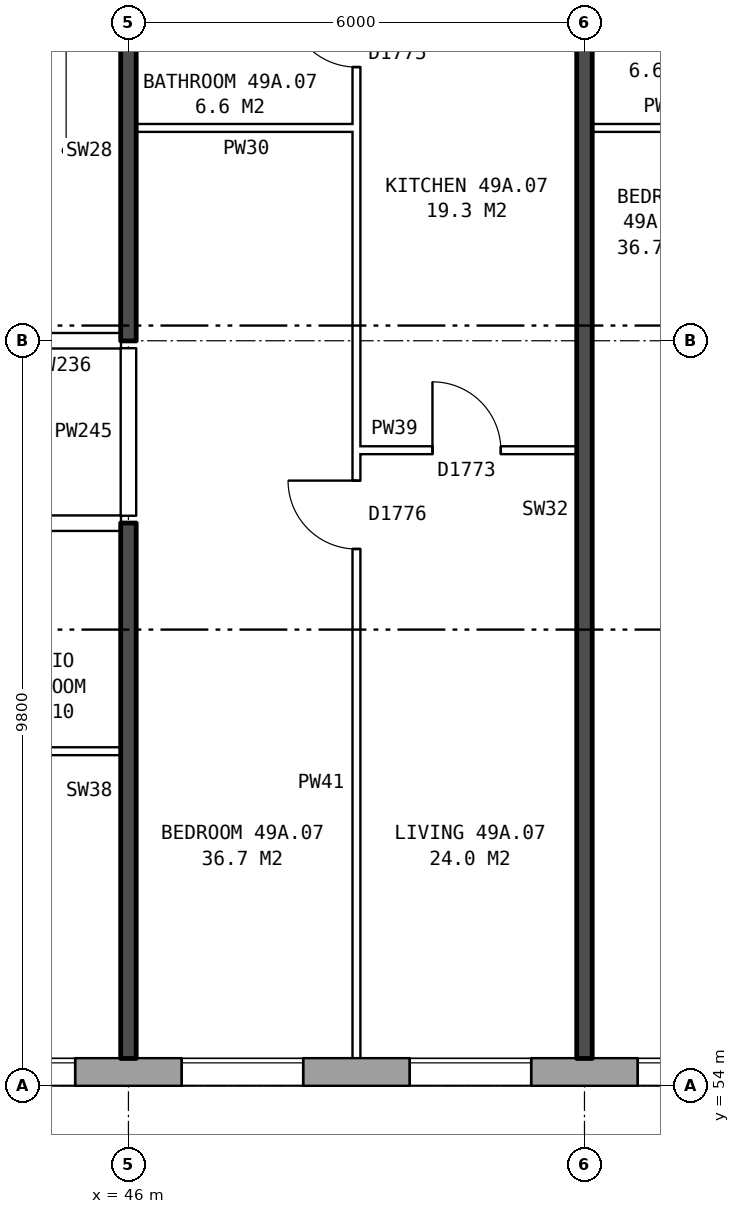
"""IFC4 building model, lengths in metres.
Left out: names, types, materials, properties, quantities, classifications, styles, units other than length and angle.
Written with IfcOpenShell. Run it as: python <this file> out.ifc"""

import sys

from ifc_helpers import new_model, si_unit, direction, frame, frame_2d, origin, place, context, subcontext, project, spatial, rectangle, extrude, element, fill, save


model = new_model("IFC4")
c1 = context("Model", 3, precision=1e-05, world=origin(), true_north=direction((0.0, 1.0)))
c2 = subcontext(c1, "Body", "Model", "MODEL_VIEW")
j1 = project(units=[si_unit("LENGTHUNIT", "METRE"), si_unit("PLANEANGLEUNIT", "RADIAN")], contexts=[c1])
p1 = place(None, origin())
s1 = spatial("IfcSite", under=j1, at=p1, CompositionType="ELEMENT")
p2 = place(p1, origin())
s2 = spatial("IfcBuilding", under=s1, at=p2, CompositionType="ELEMENT")
p3 = place(p2, frame((0.0, 0.0, 175.8)))
s3 = spatial("IfcBuildingStorey", under=s2, at=p3, CompositionType="ELEMENT", Elevation=175.8)
p4 = place(p3, frame((33.325, 54.18, 0.0), z_axis=(0.0, 0.0, 1.0), x_axis=(1.0, 0.0, 0.0)))
e1 = element("IfcWall", 1, at=p4, inside=s3, PredefinedType="STANDARD", context=c2, shape_type="SweptSolid", body=[
    extrude(rectangle(XDim=39.601, YDim=0.36, at=frame_2d((19.8, 0.0))), origin(), (0.0, 0.0, 1.0), 2.85),
])
p5 = place(p4, frame((0.875, 0.0, 0.8)))
e2 = element("IfcOpeningElement", 2, at=p5, cuts=e1, PredefinedType="OPENING", context=c2, shape_type="SweptSolid", body=[
    extrude(rectangle(XDim=0.6, YDim=1.8, at=frame_2d((0.3, 0.9))), frame((0.0, 0.19, 0.0), z_axis=(0.0, -1.0, 0.0), x_axis=(1.0, 0.0, 0.0)), (0.0, 0.0, 1.0), 0.38),
])
p6 = place(p4, frame((4.375, 0.0, 0.8)))
e3 = element("IfcOpeningElement", 3, at=p6, cuts=e1, PredefinedType="OPENING", context=c2, shape_type="SweptSolid", body=[
    extrude(rectangle(XDim=1.6, YDim=1.8, at=frame_2d((0.8, 0.9))), frame((0.0, 0.19, 0.0), z_axis=(0.0, -1.0, 0.0), x_axis=(1.0, 0.0, 0.0)), (0.0, 0.0, 1.0), 0.38),
])
p7 = place(p4, frame((7.375, 0.0, 0.8)))
e4 = element("IfcOpeningElement", 4, at=p7, cuts=e1, PredefinedType="OPENING", context=c2, shape_type="SweptSolid", body=[
    extrude(rectangle(XDim=1.6, YDim=1.8, at=frame_2d((0.8, 0.9))), frame((0.0, 0.19, 0.0), z_axis=(0.0, -1.0, 0.0), x_axis=(1.0, 0.0, 0.0)), (0.0, 0.0, 1.0), 0.38),
])
p8 = place(p4, frame((10.375, 0.0, 0.8)))
e5 = element("IfcOpeningElement", 5, at=p8, cuts=e1, PredefinedType="OPENING", context=c2, shape_type="SweptSolid", body=[
    extrude(rectangle(XDim=1.6, YDim=1.8, at=frame_2d((0.8, 0.9))), frame((0.0, 0.19, 0.0), z_axis=(0.0, -1.0, 0.0), x_axis=(1.0, 0.0, 0.0)), (0.0, 0.0, 1.0), 0.38),
])
p9 = place(p4, frame((13.375, 0.0, 0.8)))
e6 = element("IfcOpeningElement", 6, at=p9, cuts=e1, PredefinedType="OPENING", context=c2, shape_type="SweptSolid", body=[
    extrude(rectangle(XDim=1.6, YDim=1.8, at=frame_2d((0.8, 0.9))), frame((0.0, 0.19, 0.0), z_axis=(0.0, -1.0, 0.0), x_axis=(1.0, 0.0, 0.0)), (0.0, 0.0, 1.0), 0.38),
])
p10 = place(p4, frame((16.375, 0.0, 0.8)))
e7 = element("IfcOpeningElement", 7, at=p10, cuts=e1, PredefinedType="OPENING", context=c2, shape_type="SweptSolid", body=[
    extrude(rectangle(XDim=1.6, YDim=1.8, at=frame_2d((0.8, 0.9))), frame((0.0, 0.19, 0.0), z_axis=(0.0, -1.0, 0.0), x_axis=(1.0, 0.0, 0.0)), (0.0, 0.0, 1.0), 0.38),
])
p11 = place(p4, frame((19.375, 0.0, 0.8)))
e8 = element("IfcOpeningElement", 8, at=p11, cuts=e1, PredefinedType="OPENING", context=c2, shape_type="SweptSolid", body=[
    extrude(rectangle(XDim=1.6, YDim=1.8, at=frame_2d((0.8, 0.9))), frame((0.0, 0.19, 0.0), z_axis=(0.0, -1.0, 0.0), x_axis=(1.0, 0.0, 0.0)), (0.0, 0.0, 1.0), 0.38),
])
p12 = place(p4, frame((22.375, 0.0, 0.8)))
e9 = element("IfcOpeningElement", 9, at=p12, cuts=e1, PredefinedType="OPENING", context=c2, shape_type="SweptSolid", body=[
    extrude(rectangle(XDim=1.6, YDim=1.8, at=frame_2d((0.8, 0.9))), frame((0.0, 0.19, 0.0), z_axis=(0.0, -1.0, 0.0), x_axis=(1.0, 0.0, 0.0)), (0.0, 0.0, 1.0), 0.38),
])
p13 = place(p4, frame((25.375, 0.0, 0.8)))
e10 = element("IfcOpeningElement", 10, at=p13, cuts=e1, PredefinedType="OPENING", context=c2, shape_type="SweptSolid", body=[
    extrude(rectangle(XDim=1.6, YDim=1.8, at=frame_2d((0.8, 0.9))), frame((0.0, 0.19, 0.0), z_axis=(0.0, -1.0, 0.0), x_axis=(1.0, 0.0, 0.0)), (0.0, 0.0, 1.0), 0.38),
])
p14 = place(p4, frame((28.375, 0.0, 0.8)))
e11 = element("IfcOpeningElement", 11, at=p14, cuts=e1, PredefinedType="OPENING", context=c2, shape_type="SweptSolid", body=[
    extrude(rectangle(XDim=1.6, YDim=1.8, at=frame_2d((0.8, 0.9))), frame((0.0, 0.19, 0.0), z_axis=(0.0, -1.0, 0.0), x_axis=(1.0, 0.0, 0.0)), (0.0, 0.0, 1.0), 0.38),
])
p15 = place(p4, frame((31.375, 0.0, 0.8)))
e12 = element("IfcOpeningElement", 12, at=p15, cuts=e1, PredefinedType="OPENING", context=c2, shape_type="SweptSolid", body=[
    extrude(rectangle(XDim=1.6, YDim=1.8, at=frame_2d((0.8, 0.9))), frame((0.0, 0.19, 0.0), z_axis=(0.0, -1.0, 0.0), x_axis=(1.0, 0.0, 0.0)), (0.0, 0.0, 1.0), 0.38),
])
p16 = place(p4, frame((33.275, 0.0, 0.8)))
e13 = element("IfcOpeningElement", 13, at=p16, cuts=e1, PredefinedType="OPENING", context=c2, shape_type="SweptSolid", body=[
    extrude(rectangle(XDim=1.6, YDim=1.8, at=frame_2d((0.8, 0.9))), frame((0.0, 0.19, 0.0), z_axis=(0.0, -1.0, 0.0), x_axis=(1.0, 0.0, 0.0)), (0.0, 0.0, 1.0), 0.38),
])
p17 = place(p4, frame((37.025, 0.0, 1.7)))
e14 = element("IfcOpeningElement", 14, at=p17, cuts=e1, PredefinedType="OPENING", context=c2, shape_type="SweptSolid", body=[
    extrude(rectangle(XDim=0.6, YDim=0.9, at=frame_2d((0.3, 0.45))), frame((0.0, 0.19, 0.0), z_axis=(0.0, -1.0, 0.0), x_axis=(1.0, 0.0, 0.0)), (0.0, 0.0, 1.0), 0.38),
])
p18 = place(p4, frame((1.775, 0.0, 1.7)))
e15 = element("IfcOpeningElement", 15, at=p18, cuts=e1, PredefinedType="OPENING", context=c2, shape_type="SweptSolid", body=[
    extrude(rectangle(XDim=0.8, YDim=0.9, at=frame_2d((0.4, 0.45))), frame((0.0, 0.19, 0.0), z_axis=(0.0, -1.0, 0.0), x_axis=(1.0, 0.0, 0.0)), (0.0, 0.0, 1.0), 0.38),
])
p19 = place(p4, frame((35.175, 0.0, 0.8)))
e16 = element("IfcOpeningElement", 16, at=p19, cuts=e1, PredefinedType="OPENING", context=c2, shape_type="SweptSolid", body=[
    extrude(rectangle(XDim=0.6, YDim=0.9, at=frame_2d((0.3, 0.45))), frame((0.0, 0.19, 0.0), z_axis=(0.0, -1.0, 0.0), x_axis=(1.0, 0.0, 0.0)), (0.0, 0.0, 1.0), 0.38),
])
p20 = place(p4, frame((37.975, 0.0, 0.8)))
e17 = element("IfcOpeningElement", 17, at=p20, cuts=e1, PredefinedType="OPENING", context=c2, shape_type="SweptSolid", body=[
    extrude(rectangle(XDim=1.2, YDim=1.8, at=frame_2d((0.6, 0.9))), frame((0.0, 0.19, 0.0), z_axis=(0.0, -1.0, 0.0), x_axis=(1.0, 0.0, 0.0)), (0.0, 0.0, 1.0), 0.38),
])
p21 = place(p3, frame((43.6, 58.4, 0.0), z_axis=(0.0, 0.0, 1.0), x_axis=(1.0, 0.0, 0.0)))
e18 = element("IfcWall", 18, at=p21, inside=s3, PredefinedType="PARTITIONING", context=c2, shape_type="SweptSolid", body=[
    extrude(rectangle(XDim=2.3, YDim=0.1, at=frame_2d((1.15, 0.0))), origin(), (0.0, 0.0, 1.0), 2.85),
])
p22 = place(p3, frame((30.61, 61.4, 0.0), z_axis=(0.0, 0.0, 1.0), x_axis=(1.0, 0.0, 0.0)))
e19 = element("IfcWall", 19, at=p22, inside=s3, PredefinedType="PARTITIONING", context=c2, shape_type="SweptSolid", body=[
    extrude(rectangle(XDim=15.29, YDim=0.2, at=frame_2d((7.645, 0.0))), origin(), (0.0, 0.0, 1.0), 2.85),
])
p23 = place(p22, frame((10.69, 0.0, 0.0)))
e20 = element("IfcOpeningElement", 20, at=p23, cuts=e19, PredefinedType="OPENING", context=c2, shape_type="SweptSolid", body=[
    extrude(rectangle(XDim=1.0, YDim=2.1, at=frame_2d((0.5, 1.05))), frame((0.0, 0.11, 0.0), z_axis=(0.0, -1.0, 0.0), x_axis=(1.0, 0.0, 0.0)), (0.0, 0.0, 1.0), 0.22),
])
p24 = place(p22, frame((5.89, 0.0, 0.0)))
e21 = element("IfcOpeningElement", 21, at=p24, cuts=e19, PredefinedType="OPENING", context=c2, shape_type="SweptSolid", body=[
    extrude(rectangle(XDim=1.0, YDim=2.1, at=frame_2d((0.5, 1.05))), frame((0.0, 0.11, 0.0), z_axis=(0.0, -1.0, 0.0), x_axis=(1.0, 0.0, 0.0)), (0.0, 0.0, 1.0), 0.22),
])
p25 = place(p3, frame((49.0, 62.36, 0.0), z_axis=(0.0, 0.0, 1.0), x_axis=(1.0, 0.0, 0.0)))
e22 = element("IfcWall", 22, at=p25, inside=s3, PredefinedType="PARTITIONING", context=c2, shape_type="SweptSolid", body=[
    extrude(rectangle(XDim=2.9, YDim=0.1, at=frame_2d((1.45, 0.0))), origin(), (0.0, 0.0, 1.0), 2.85),
])
p26 = place(p25, frame((1.0, 0.0, 0.0)))
e23 = element("IfcOpeningElement", 23, at=p26, cuts=e22, PredefinedType="OPENING", context=c2, shape_type="SweptSolid", body=[
    extrude(rectangle(XDim=0.9, YDim=2.1, at=frame_2d((0.45, 1.05))), frame((0.0, 0.06, 0.0), z_axis=(0.0, -1.0, 0.0), x_axis=(1.0, 0.0, 0.0)), (0.0, 0.0, 1.0), 0.12),
])
p27 = place(p3, frame((44.36, 63.8, 0.0), z_axis=(0.0, 0.0, 1.0), x_axis=(1.0, 0.0, 0.0)))
e24 = element("IfcWall", 24, at=p27, inside=s3, PredefinedType="PARTITIONING", context=c2, shape_type="SweptSolid", body=[
    extrude(rectangle(XDim=1.54, YDim=0.2, at=frame_2d((0.77, 0.0))), origin(), (0.0, 0.0, 1.0), 2.85),
])
for number, where, z_axis, x_axis in (
    (25, (46.1, 66.6, 0.0), (0.0, 0.0, 1.0), (1.0, 0.0, 0.0)),
    (26, (52.1, 66.6, 0.0), (0.0, 0.0, 1.0), (1.0, 0.0, 0.0)),
):
    element("IfcWall", number, at=place(p3, frame(where, z_axis=z_axis, x_axis=x_axis)), inside=s3, PredefinedType="PARTITIONING", context=c2, shape_type="SweptSolid", body=[
        extrude(rectangle(XDim=2.9, YDim=0.1, at=frame_2d((1.45, 0.0))), origin(), (0.0, 0.0, 1.0), 2.85),
    ])
p28 = place(p3, frame((46.0, 54.36, 0.0), z_axis=(0.0, 0.0, 1.0), x_axis=(0.0, 1.0, 0.0)))
e27 = element("IfcWall", 27, at=p28, inside=s3, PredefinedType="SOLIDWALL", context=c2, shape_type="SweptSolid", body=[
    extrude(rectangle(XDim=7.04, YDim=0.2, at=frame_2d((3.52, 0.0))), origin(), (0.0, 0.0, 1.0), 2.85),
])
p29 = place(p3, frame((46.0, 61.5, 0.0), z_axis=(0.0, 0.0, 1.0), x_axis=(0.0, 1.0, 0.0)))
e28 = element("IfcWall", 28, at=p29, inside=s3, PredefinedType="PARTITIONING", context=c2, shape_type="SweptSolid", body=[
    extrude(rectangle(XDim=2.2, YDim=0.2, at=frame_2d((1.1, 0.0))), origin(), (0.0, 0.0, 1.0), 2.85),
])
p30 = place(p3, frame((46.0, 63.8, 0.0), z_axis=(0.0, 0.0, 1.0), x_axis=(0.0, 1.0, 0.0)))
e29 = element("IfcWall", 29, at=p30, inside=s3, PredefinedType="SOLIDWALL", context=c2, shape_type="SweptSolid", body=[
    extrude(rectangle(XDim=5.0, YDim=0.2, at=frame_2d((2.5, 0.0))), origin(), (0.0, 0.0, 1.0), 2.85),
])
p31 = place(p3, frame((49.0, 54.36, 0.0), z_axis=(0.0, 0.0, 1.0), x_axis=(0.0, 1.0, 0.0)))
e30 = element("IfcWall", 30, at=p31, inside=s3, PredefinedType="PARTITIONING", context=c2, shape_type="SweptSolid", body=[
    extrude(rectangle(XDim=14.34, YDim=0.1, at=frame_2d((7.17, 0.0))), origin(), (0.0, 0.0, 1.0), 2.85),
])
p32 = place(p31, frame((6.7, 0.0, 0.0)))
e31 = element("IfcOpeningElement", 31, at=p32, cuts=e30, PredefinedType="OPENING", context=c2, shape_type="SweptSolid", body=[
    extrude(rectangle(XDim=0.9, YDim=2.1, at=frame_2d((0.45, 1.05))), frame((0.0, 0.06, 0.0), z_axis=(0.0, -1.0, 0.0), x_axis=(1.0, 0.0, 0.0)), (0.0, 0.0, 1.0), 0.12),
])
p33 = place(p31, frame((13.04, 0.0, 0.0)))
e32 = element("IfcOpeningElement", 32, at=p33, cuts=e30, PredefinedType="OPENING", context=c2, shape_type="SweptSolid", body=[
    extrude(rectangle(XDim=0.9, YDim=2.1, at=frame_2d((0.45, 1.05))), frame((0.0, 0.06, 0.0), z_axis=(0.0, -1.0, 0.0), x_axis=(1.0, 0.0, 0.0)), (0.0, 0.0, 1.0), 0.12),
])
p34 = place(p3, frame((52.0, 54.36, 0.0), z_axis=(0.0, 0.0, 1.0), x_axis=(0.0, 1.0, 0.0)))
e33 = element("IfcWall", 33, at=p34, inside=s3, PredefinedType="SOLIDWALL", context=c2, shape_type="SweptSolid", body=[
    extrude(rectangle(XDim=14.44, YDim=0.2, at=frame_2d((7.22, 0.0))), origin(), (0.0, 0.0, 1.0), 2.85),
])
p35 = place(p8, origin())
e34 = element("IfcWindow", 34, at=p35, inside=s3, PartitioningType="SINGLE_PANEL", PredefinedType="WINDOW", context=c2, shape_type="SweptSolid", body=[
    extrude(rectangle(XDim=1.6, YDim=1.8, at=frame_2d((0.8, 0.9))), frame((0.0, 0.15, 0.0), z_axis=(0.0, -1.0, 0.0), x_axis=(1.0, 0.0, 0.0)), (0.0, 0.0, 1.0), 0.06),
])
fill(e5, e34)
p36 = place(p9, origin())
e35 = element("IfcWindow", 35, at=p36, inside=s3, PartitioningType="SINGLE_PANEL", PredefinedType="WINDOW", context=c2, shape_type="SweptSolid", body=[
    extrude(rectangle(XDim=1.6, YDim=1.8, at=frame_2d((0.8, 0.9))), frame((0.0, 0.15, 0.0), z_axis=(0.0, -1.0, 0.0), x_axis=(1.0, 0.0, 0.0)), (0.0, 0.0, 1.0), 0.06),
])
fill(e6, e35)
p37 = place(p10, origin())
e36 = element("IfcWindow", 36, at=p37, inside=s3, PartitioningType="SINGLE_PANEL", PredefinedType="WINDOW", context=c2, shape_type="SweptSolid", body=[
    extrude(rectangle(XDim=1.6, YDim=1.8, at=frame_2d((0.8, 0.9))), frame((0.0, 0.15, 0.0), z_axis=(0.0, -1.0, 0.0), x_axis=(1.0, 0.0, 0.0)), (0.0, 0.0, 1.0), 0.06),
])
fill(e7, e36)
p38 = place(p11, origin())
e37 = element("IfcWindow", 37, at=p38, inside=s3, PartitioningType="SINGLE_PANEL", PredefinedType="WINDOW", context=c2, shape_type="SweptSolid", body=[
    extrude(rectangle(XDim=1.6, YDim=1.8, at=frame_2d((0.8, 0.9))), frame((0.0, 0.15, 0.0), z_axis=(0.0, -1.0, 0.0), x_axis=(1.0, 0.0, 0.0)), (0.0, 0.0, 1.0), 0.06),
])
fill(e8, e37)
p39 = place(p32, origin())
e38 = element("IfcDoor", 38, at=p39, inside=s3, OperationType="SINGLE_SWING_RIGHT", PredefinedType="DOOR", context=c2, shape_type="SweptSolid", body=[
    extrude(rectangle(XDim=0.9, YDim=2.1, at=frame_2d((0.45, 1.05))), frame((0.0, 0.025, 0.0), z_axis=(0.0, -1.0, 0.0), x_axis=(1.0, 0.0, 0.0)), (0.0, 0.0, 1.0), 0.05),
])
fill(e31, e38)
p40 = place(p26, origin())
e39 = element("IfcDoor", 39, at=p40, inside=s3, OperationType="SINGLE_SWING_LEFT", PredefinedType="DOOR", context=c2, shape_type="SweptSolid", body=[
    extrude(rectangle(XDim=0.9, YDim=2.1, at=frame_2d((0.45, 1.05))), frame((0.0, 0.025, 0.0), z_axis=(0.0, -1.0, 0.0), x_axis=(1.0, 0.0, 0.0)), (0.0, 0.0, 1.0), 0.05),
])
fill(e23, e39)
p41 = place(p33, origin())
e40 = element("IfcDoor", 40, at=p41, inside=s3, OperationType="SINGLE_SWING_RIGHT", PredefinedType="DOOR", context=c2, shape_type="SweptSolid", body=[
    extrude(rectangle(XDim=0.9, YDim=2.1, at=frame_2d((0.45, 1.05))), frame((0.0, 0.025, 0.0), z_axis=(0.0, -1.0, 0.0), x_axis=(1.0, 0.0, 0.0)), (0.0, 0.0, 1.0), 0.05),
])
fill(e32, e40)
save(model, sys.argv[1])
